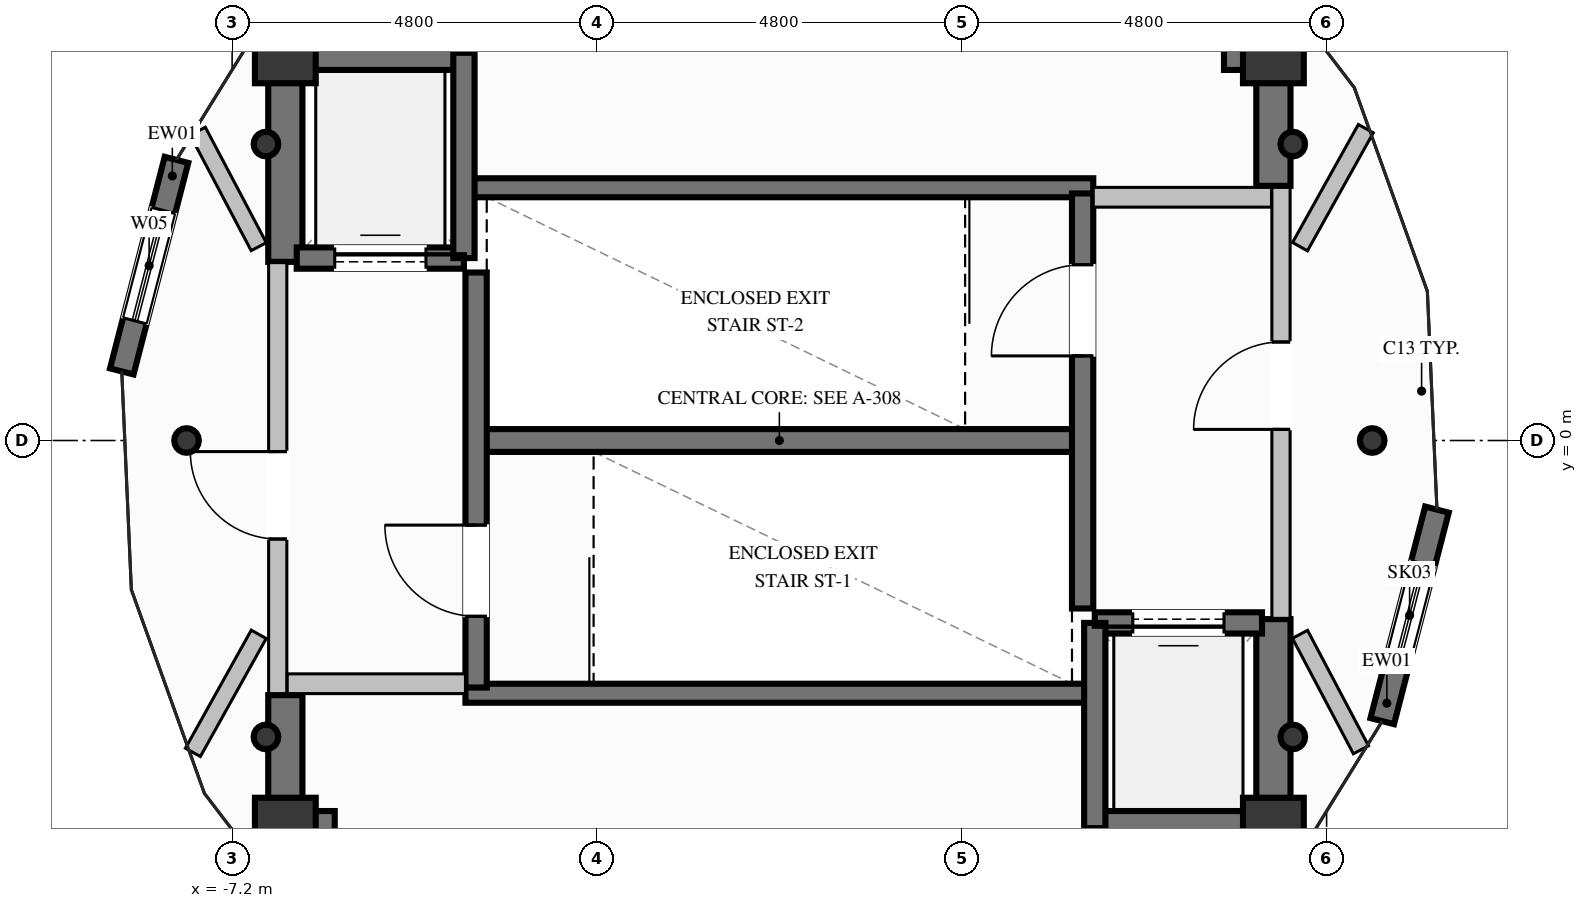
"""IFC4 building model, lengths in metres.
Left out: names, types, materials, properties, quantities, classifications, styles, units other than length and angle.
Written with IfcOpenShell. Run it as: python <this file> out.ifc"""

import sys

from ifc_helpers import new_model, si_unit, direction, frame, frame_2d, origin, origin_2d, place, context, subcontext, project, spatial, rectangle, hollow_circle, extrude, element, fill, save


model = new_model("IFC4")
c1 = context("Model", 3, precision=1e-05, world=origin(), true_north=direction((0.0, 1.0)))
c2 = subcontext(c1, "Body", "Model", "MODEL_VIEW")
j1 = project(units=[si_unit("LENGTHUNIT", "METRE"), si_unit("PLANEANGLEUNIT", "RADIAN")], contexts=[c1])
p1 = place(None, origin())
s1 = spatial("IfcSite", under=j1, at=p1, CompositionType="ELEMENT")
p2 = place(p1, origin())
s2 = spatial("IfcBuilding", under=s1, at=p2, CompositionType="ELEMENT")
p3 = place(p2, frame((0.0, 0.0, 333.8)))
s3 = spatial("IfcBuildingStorey", under=s2, at=p3, CompositionType="ELEMENT", Elevation=333.8)
for number, where, z_axis, x_axis in (
    (1, (-6.5, -5.1, 0.0), (0.0, 0.0, 1.0), (1.0, 0.0, 0.0)),
    (2, (6.5, -5.1, 0.0), (0.0, 0.0, 1.0), (1.0, 0.0, 0.0)),
    (3, (6.5, 5.1, 0.0), (0.0, 0.0, 1.0), (1.0, 0.0, 0.0)),
    (4, (-6.5, 5.1, 0.0), (0.0, 0.0, 1.0), (1.0, 0.0, 0.0)),
):
    element("IfcColumn", number, at=place(p3, frame(where, z_axis=z_axis, x_axis=x_axis)), inside=s3, PredefinedType="COLUMN", context=c2, shape_type="SweptSolid", body=[
        extrude(rectangle(XDim=0.8, YDim=0.8, at=origin_2d()), origin(), (0.0, 0.0, 1.0), 6.4),
    ])
p4 = place(p3, frame((-3.99, 0.0, 0.0), z_axis=(0.0, 0.0, 1.0), x_axis=(1.0, 0.0, 0.0)))
e5 = element("IfcWall", 5, at=p4, inside=s3, PredefinedType="SHEAR", context=c2, shape_type="SweptSolid", body=[
    extrude(rectangle(XDim=7.98, YDim=0.3, at=frame_2d((3.99, 0.0))), origin(), (0.0, 0.0, 1.0), 6.4),
])
for number, where, z_axis, x_axis in (
    (6, (-4.13, -3.325, 0.0), (0.0, 0.0, 1.0), (1.0, 0.0, 0.0)),
    (7, (-4.13, 3.325, 0.0), (0.0, 0.0, 1.0), (1.0, 0.0, 0.0)),
):
    element("IfcWall", number, at=place(p3, frame(where, z_axis=z_axis, x_axis=x_axis)), inside=s3, PredefinedType="SOLIDWALL", context=c2, shape_type="SweptSolid", body=[
        extrude(rectangle(XDim=8.26, YDim=0.25, at=frame_2d((4.13, 0.0))), origin(), (0.0, 0.0, 1.0), 6.4),
    ])
p5 = place(p3, frame((-6.275, -5.1, 0.0), z_axis=(0.0, 0.0, 1.0), x_axis=(1.0, 0.0, 0.0)))
e8 = element("IfcWall", 8, at=p5, inside=s3, PredefinedType="SHEAR", context=c2, shape_type="SweptSolid", body=[
    extrude(rectangle(XDim=0.425, YDim=0.45, at=frame_2d((0.212, 0.0))), origin(), (0.0, 0.0, 1.0), 6.4),
])
for number, where, z_axis, x_axis in (
    (9, (4.15, -5.1, 0.0), (0.0, 0.0, 1.0), (1.0, 0.0, 0.0)),
    (10, (-6.275, 5.1, 0.0), (0.0, 0.0, 1.0), (1.0, 0.0, 0.0)),
):
    element("IfcWall", number, at=place(p3, frame(where, z_axis=z_axis, x_axis=x_axis)), inside=s3, PredefinedType="SHEAR", context=c2, shape_type="SweptSolid", body=[
        extrude(rectangle(XDim=2.125, YDim=0.45, at=frame_2d((1.062, 0.0))), origin(), (0.0, 0.0, 1.0), 6.4),
    ])
p6 = place(p3, frame((5.85, 5.1, 0.0), z_axis=(0.0, 0.0, 1.0), x_axis=(1.0, 0.0, 0.0)))
e11 = element("IfcWall", 11, at=p6, inside=s3, PredefinedType="SHEAR", context=c2, shape_type="SweptSolid", body=[
    extrude(rectangle(XDim=0.425, YDim=0.45, at=frame_2d((0.212, 0.0))), origin(), (0.0, 0.0, 1.0), 6.4),
])
p7 = place(p3, frame((-6.5, 2.35, 0.0), z_axis=(0.0, 0.0, 1.0), x_axis=(0.0, 1.0, 0.0)))
e12 = element("IfcWall", 12, at=p7, inside=s3, PredefinedType="SHEAR", context=c2, shape_type="SweptSolid", body=[
    extrude(rectangle(XDim=2.975, YDim=0.45, at=frame_2d((1.487, 0.0))), origin(), (0.0, 0.0, 1.0), 6.4),
])
p8 = place(p3, frame((-6.5, -5.325, 0.0), z_axis=(0.0, 0.0, 1.0), x_axis=(0.0, 1.0, 0.0)))
e13 = element("IfcWall", 13, at=p8, inside=s3, PredefinedType="SHEAR", context=c2, shape_type="SweptSolid", body=[
    extrude(rectangle(XDim=1.975, YDim=0.45, at=frame_2d((0.987, 0.0))), origin(), (0.0, 0.0, 1.0), 6.4),
])
p9 = place(p3, frame((6.5, -5.325, 0.0), z_axis=(0.0, 0.0, 1.0), x_axis=(0.0, 1.0, 0.0)))
e14 = element("IfcWall", 14, at=p9, inside=s3, PredefinedType="SHEAR", context=c2, shape_type="SweptSolid", body=[
    extrude(rectangle(XDim=2.975, YDim=0.45, at=frame_2d((1.487, 0.0))), origin(), (0.0, 0.0, 1.0), 6.4),
])
p10 = place(p3, frame((6.5, 3.35, 0.0), z_axis=(0.0, 0.0, 1.0), x_axis=(0.0, 1.0, 0.0)))
e15 = element("IfcWall", 15, at=p10, inside=s3, PredefinedType="SHEAR", context=c2, shape_type="SweptSolid", body=[
    extrude(rectangle(XDim=1.975, YDim=0.45, at=frame_2d((0.987, 0.0))), origin(), (0.0, 0.0, 1.0), 6.4),
])
for number, where, z_axis, x_axis in (
    (16, (7.8, 0.0, 0.0), (0.0, 0.0, 1.0), (1.0, 0.0, 0.0)),
    (17, (6.755, 3.9, 0.0), (0.0, 0.0, 1.0), (1.0, 0.0, 0.0)),
    (18, (-6.755, 3.9, 0.0), (0.0, 0.0, 1.0), (1.0, 0.0, 0.0)),
    (19, (-7.8, 0.0, 0.0), (0.0, 0.0, 1.0), (1.0, 0.0, 0.0)),
    (20, (-6.755, -3.9, 0.0), (0.0, 0.0, 1.0), (1.0, 0.0, 0.0)),
    (21, (6.755, -3.9, 0.0), (0.0, 0.0, 1.0), (1.0, 0.0, 0.0)),
):
    element("IfcColumn", number, at=place(p3, frame(where, z_axis=z_axis, x_axis=x_axis)), inside=s3, PredefinedType="COLUMN", context=c2, shape_type="SweptSolid", body=[
        extrude(hollow_circle(Radius=0.162, WallThickness=0.014, at=origin_2d()), origin(), (0.0, 0.0, 1.0), 6.4),
    ])
p11 = place(p3, frame((8.652, -0.909, 0.0), z_axis=(0.0, 0.0, 1.0), x_axis=(-0.250540655551, -0.968106078855, 0.0)))
e22 = element("IfcWall", 22, at=p11, inside=s3, PredefinedType="SOLIDWALL", context=c2, shape_type="SweptSolid", body=[
    extrude(rectangle(XDim=2.875, YDim=0.32, at=frame_2d((1.438, 0.0))), origin(), (0.0, 0.0, 1.0), 6.1),
])
p12 = place(p11, frame((0.737, 0.0, 0.6)))
e23 = element("IfcOpeningElement", 23, at=p12, cuts=e22, PredefinedType="OPENING", context=c2, shape_type="SweptSolid", body=[
    extrude(rectangle(XDim=1.4, YDim=1.8, at=frame_2d((0.7, 0.9))), frame((0.0, 0.17, 0.0), z_axis=(0.0, -1.0, 0.0), x_axis=(1.0, 0.0, 0.0)), (0.0, 0.0, 1.0), 0.34),
])
p13 = place(p3, frame((-8.652, 0.909, 0.0), z_axis=(0.0, 0.0, 1.0), x_axis=(0.250540655551, 0.968106078855, 0.0)))
e24 = element("IfcWall", 24, at=p13, inside=s3, PredefinedType="SOLIDWALL", context=c2, shape_type="SweptSolid", body=[
    extrude(rectangle(XDim=2.875, YDim=0.32, at=frame_2d((1.438, 0.0))), origin(), (0.0, 0.0, 1.0), 6.1),
])
p14 = place(p13, frame((0.687, 0.0, 1.1)))
e25 = element("IfcOpeningElement", 25, at=p14, cuts=e24, PredefinedType="OPENING", context=c2, shape_type="SweptSolid", body=[
    extrude(rectangle(XDim=1.5, YDim=1.2, at=frame_2d((0.75, 0.6))), frame((0.0, 0.17, 0.0), z_axis=(0.0, -1.0, 0.0), x_axis=(1.0, 0.0, 0.0)), (0.0, 0.0, 1.0), 0.34),
])
p15 = place(p3, frame((-6.35, 2.4, 0.0), z_axis=(0.0, 0.0, 1.0), x_axis=(1.0, 0.0, 0.0)))
e26 = element("IfcWall", 26, at=p15, inside=s3, PredefinedType="SOLIDWALL", context=c2, shape_type="SweptSolid", body=[
    extrude(rectangle(XDim=2.2, YDim=0.28, at=frame_2d((1.1, 0.0))), origin(), (0.0, 0.0, 1.0), 6.1),
])
p16 = place(p15, frame((0.5, 0.0, 0.0)))
e27 = element("IfcOpeningElement", 27, at=p16, cuts=e26, PredefinedType="OPENING", context=c2, shape_type="SweptSolid", body=[
    extrude(rectangle(XDim=1.2, YDim=2.2, at=frame_2d((0.6, 1.1))), frame((0.0, 0.15, 0.0), z_axis=(0.0, -1.0, 0.0), x_axis=(1.0, 0.0, 0.0)), (0.0, 0.0, 1.0), 0.3),
])
p17 = place(p3, frame((-4.15, 2.4, 0.0), z_axis=(0.0, 0.0, 1.0), x_axis=(0.0, 1.0, 0.0)))
e28 = element("IfcWall", 28, at=p17, inside=s3, PredefinedType="SOLIDWALL", context=c2, shape_type="SweptSolid", body=[
    extrude(rectangle(XDim=2.7, YDim=0.28, at=frame_2d((1.35, 0.0))), origin(), (0.0, 0.0, 1.0), 6.1),
])
p18 = place(p3, frame((6.35, -2.4, 0.0), z_axis=(0.0, 0.0, 1.0), x_axis=(-1.0, 0.0, 0.0)))
e29 = element("IfcWall", 29, at=p18, inside=s3, PredefinedType="SOLIDWALL", context=c2, shape_type="SweptSolid", body=[
    extrude(rectangle(XDim=2.2, YDim=0.28, at=frame_2d((1.1, 0.0))), origin(), (0.0, 0.0, 1.0), 6.1),
])
p19 = place(p18, frame((0.5, 0.0, 0.0)))
e30 = element("IfcOpeningElement", 30, at=p19, cuts=e29, PredefinedType="OPENING", context=c2, shape_type="SweptSolid", body=[
    extrude(rectangle(XDim=1.2, YDim=2.2, at=frame_2d((0.6, 1.1))), frame((0.0, 0.15, 0.0), z_axis=(0.0, -1.0, 0.0), x_axis=(1.0, 0.0, 0.0)), (0.0, 0.0, 1.0), 0.3),
])
p20 = place(p3, frame((4.15, -2.4, 0.0), z_axis=(0.0, 0.0, 1.0), x_axis=(0.0, -1.0, 0.0)))
e31 = element("IfcWall", 31, at=p20, inside=s3, PredefinedType="SOLIDWALL", context=c2, shape_type="SweptSolid", body=[
    extrude(rectangle(XDim=2.7, YDim=0.28, at=frame_2d((1.35, 0.0))), origin(), (0.0, 0.0, 1.0), 6.1),
])
p21 = place(p3, frame((-3.99, -3.25, 0.0), z_axis=(0.0, 0.0, 1.0), x_axis=(0.0, 1.0, 0.0)))
e32 = element("IfcWall", 32, at=p21, inside=s3, PredefinedType="SOLIDWALL", context=c2, shape_type="SweptSolid", body=[
    extrude(rectangle(XDim=5.46, YDim=0.28, at=frame_2d((2.73, 0.0))), origin(), (0.0, 0.0, 1.0), 6.1),
])
p22 = place(p21, frame((0.937, 0.0, 0.0)))
e33 = element("IfcOpeningElement", 33, at=p22, cuts=e32, PredefinedType="OPENING", context=c2, shape_type="SweptSolid", body=[
    extrude(rectangle(XDim=1.2, YDim=2.2, at=frame_2d((0.6, 1.1))), frame((0.0, 0.15, 0.0), z_axis=(0.0, -1.0, 0.0), x_axis=(1.0, 0.0, 0.0)), (0.0, 0.0, 1.0), 0.3),
])
p23 = place(p3, frame((3.99, -2.21, 0.0), z_axis=(0.0, 0.0, 1.0), x_axis=(0.0, 1.0, 0.0)))
e34 = element("IfcWall", 34, at=p23, inside=s3, PredefinedType="SOLIDWALL", context=c2, shape_type="SweptSolid", body=[
    extrude(rectangle(XDim=5.46, YDim=0.28, at=frame_2d((2.73, 0.0))), origin(), (0.0, 0.0, 1.0), 6.1),
])
p24 = place(p23, frame((3.323, 0.0, 0.0)))
e35 = element("IfcOpeningElement", 35, at=p24, cuts=e34, PredefinedType="OPENING", context=c2, shape_type="SweptSolid", body=[
    extrude(rectangle(XDim=1.2, YDim=2.2, at=frame_2d((0.6, 1.1))), frame((0.0, 0.15, 0.0), z_axis=(0.0, -1.0, 0.0), x_axis=(1.0, 0.0, 0.0)), (0.0, 0.0, 1.0), 0.3),
])
p25 = place(p3, frame((-6.6, -3.33, 0.0), z_axis=(0.0, 0.0, 1.0), x_axis=(0.0, 1.0, 0.0)))
e36 = element("IfcWall", 36, at=p25, inside=s3, PredefinedType="PARTITIONING", context=c2, shape_type="SweptSolid", body=[
    extrude(rectangle(XDim=5.67, YDim=0.24, at=frame_2d((2.835, 0.0))), origin(), (0.0, 0.0, 1.0), 4.985),
])
p26 = place(p25, frame((2.034, 0.0, 0.0)))
e37 = element("IfcOpeningElement", 37, at=p26, cuts=e36, PredefinedType="OPENING", context=c2, shape_type="SweptSolid", body=[
    extrude(rectangle(XDim=1.15, YDim=2.2, at=frame_2d((0.575, 1.1))), frame((0.0, 0.13, 0.0), z_axis=(0.0, -1.0, 0.0), x_axis=(1.0, 0.0, 0.0)), (0.0, 0.0, 1.0), 0.26),
])
p27 = place(p3, frame((-6.475, -3.2, 0.0), z_axis=(0.0, 0.0, 1.0), x_axis=(1.0, 0.0, 0.0)))
e38 = element("IfcWall", 38, at=p27, inside=s3, PredefinedType="PARTITIONING", context=c2, shape_type="SweptSolid", body=[
    extrude(rectangle(XDim=2.345, YDim=0.26, at=frame_2d((1.173, 0.0))), origin(), (0.0, 0.0, 1.0), 6.1),
])
p28 = place(p3, frame((6.6, -2.34, 0.0), z_axis=(0.0, 0.0, 1.0), x_axis=(0.0, 1.0, 0.0)))
e39 = element("IfcWall", 39, at=p28, inside=s3, PredefinedType="PARTITIONING", context=c2, shape_type="SweptSolid", body=[
    extrude(rectangle(XDim=5.67, YDim=0.24, at=frame_2d((2.835, 0.0))), origin(), (0.0, 0.0, 1.0), 4.985),
])
p29 = place(p28, frame((2.486, 0.0, 0.0)))
e40 = element("IfcOpeningElement", 40, at=p29, cuts=e39, PredefinedType="OPENING", context=c2, shape_type="SweptSolid", body=[
    extrude(rectangle(XDim=1.15, YDim=2.2, at=frame_2d((0.575, 1.1))), frame((0.0, 0.13, 0.0), z_axis=(0.0, -1.0, 0.0), x_axis=(1.0, 0.0, 0.0)), (0.0, 0.0, 1.0), 0.26),
])
p30 = place(p3, frame((4.13, 3.2, 0.0), z_axis=(0.0, 0.0, 1.0), x_axis=(1.0, 0.0, 0.0)))
e41 = element("IfcWall", 41, at=p30, inside=s3, PredefinedType="PARTITIONING", context=c2, shape_type="SweptSolid", body=[
    extrude(rectangle(XDim=2.345, YDim=0.26, at=frame_2d((1.173, 0.0))), origin(), (0.0, 0.0, 1.0), 6.1),
])
p31 = place(p3, frame((-6.85, 2.55, 0.0), z_axis=(0.0, 0.0, 1.0), x_axis=(-0.466888304663, 0.884316295773, 0.0)))
e42 = element("IfcWall", 42, at=p31, inside=s3, PredefinedType="PARTITIONING", context=c2, shape_type="SweptSolid", body=[
    extrude(rectangle(XDim=1.718, YDim=0.225, at=frame_2d((0.859, 0.0))), origin(), (0.0, 0.0, 1.0), 4.985),
])
for number, where, z_axis, x_axis in (
    (43, (-6.85, -2.55, 0.0), (0.0, 0.0, 1.0), (-0.487, -0.873, 0.0)),
    (44, (6.85, 2.55, 0.0), (0.0, 0.0, 1.0), (0.487, 0.873, 0.0)),
):
    element("IfcWall", number, at=place(p3, frame(where, z_axis=z_axis, x_axis=x_axis)), inside=s3, PredefinedType="PARTITIONING", context=c2, shape_type="SweptSolid", body=[
        extrude(rectangle(XDim=1.778, YDim=0.225, at=frame_2d((0.889, 0.0))), origin(), (0.0, 0.0, 1.0), 6.1),
    ])
p32 = place(p3, frame((6.85, -2.55, 0.0), z_axis=(0.0, 0.0, 1.0), x_axis=(0.466888304663, -0.884316295773, 0.0)))
e45 = element("IfcWall", 45, at=p32, inside=s3, PredefinedType="PARTITIONING", context=c2, shape_type="SweptSolid", body=[
    extrude(rectangle(XDim=1.718, YDim=0.225, at=frame_2d((0.859, 0.0))), origin(), (0.0, 0.0, 1.0), 4.985),
])
p33 = place(p12, origin())
e46 = element("IfcWindow", 46, at=p33, inside=s3, PartitioningType="SINGLE_PANEL", PredefinedType="SKYLIGHT", context=c2, shape_type="SweptSolid", body=[
    extrude(rectangle(XDim=1.4, YDim=1.8, at=frame_2d((0.7, 0.9))), frame((0.0, 0.03, 0.0), z_axis=(0.0, -1.0, 0.0), x_axis=(1.0, 0.0, 0.0)), (0.0, 0.0, 1.0), 0.06),
])
fill(e23, e46)
p34 = place(p14, origin())
e47 = element("IfcWindow", 47, at=p34, inside=s3, PartitioningType="SINGLE_PANEL", PredefinedType="WINDOW", context=c2, shape_type="SweptSolid", body=[
    extrude(rectangle(XDim=1.5, YDim=1.2, at=frame_2d((0.75, 0.6))), frame((0.0, 0.03, 0.0), z_axis=(0.0, -1.0, 0.0), x_axis=(1.0, 0.0, 0.0)), (0.0, 0.0, 1.0), 0.06),
])
fill(e25, e47)
p35 = place(p16, origin())
e48 = element("IfcDoor", 48, at=p35, inside=s3, OperationType="SLIDING_TO_LEFT", PredefinedType="DOOR", context=c2, shape_type="SweptSolid", body=[
    extrude(rectangle(XDim=1.2, YDim=2.2, at=frame_2d((0.6, 1.1))), frame((0.0, 0.025, 0.0), z_axis=(0.0, -1.0, 0.0), x_axis=(1.0, 0.0, 0.0)), (0.0, 0.0, 1.0), 0.05),
])
fill(e27, e48)
p36 = place(p19, origin())
e49 = element("IfcDoor", 49, at=p36, inside=s3, OperationType="SLIDING_TO_LEFT", PredefinedType="DOOR", context=c2, shape_type="SweptSolid", body=[
    extrude(rectangle(XDim=1.2, YDim=2.2, at=frame_2d((0.6, 1.1))), frame((0.0, 0.025, 0.0), z_axis=(0.0, -1.0, 0.0), x_axis=(1.0, 0.0, 0.0)), (0.0, 0.0, 1.0), 0.05),
])
fill(e30, e49)
p37 = place(p22, origin())
e50 = element("IfcDoor", 50, at=p37, inside=s3, OperationType="SINGLE_SWING_RIGHT", PredefinedType="DOOR", context=c2, shape_type="SweptSolid", body=[
    extrude(rectangle(XDim=1.2, YDim=2.2, at=frame_2d((0.6, 1.1))), frame((0.0, 0.025, 0.0), z_axis=(0.0, -1.0, 0.0), x_axis=(1.0, 0.0, 0.0)), (0.0, 0.0, 1.0), 0.05),
])
fill(e33, e50)
p38 = place(p24, origin())
e51 = element("IfcDoor", 51, at=p38, inside=s3, OperationType="SINGLE_SWING_LEFT", PredefinedType="DOOR", context=c2, shape_type="SweptSolid", body=[
    extrude(rectangle(XDim=1.2, YDim=2.2, at=frame_2d((0.6, 1.1))), frame((0.0, 0.025, 0.0), z_axis=(0.0, -1.0, 0.0), x_axis=(1.0, 0.0, 0.0)), (0.0, 0.0, 1.0), 0.05),
])
fill(e35, e51)
p39 = place(p26, origin())
e52 = element("IfcDoor", 52, at=p39, inside=s3, OperationType="SINGLE_SWING_RIGHT", PredefinedType="DOOR", context=c2, shape_type="SweptSolid", body=[
    extrude(rectangle(XDim=1.15, YDim=2.2, at=frame_2d((0.575, 1.1))), frame((0.0, 0.025, 0.0), z_axis=(0.0, -1.0, 0.0), x_axis=(1.0, 0.0, 0.0)), (0.0, 0.0, 1.0), 0.05),
])
fill(e37, e52)
p40 = place(p29, origin())
e53 = element("IfcDoor", 53, at=p40, inside=s3, OperationType="SINGLE_SWING_LEFT", PredefinedType="DOOR", context=c2, shape_type="SweptSolid", body=[
    extrude(rectangle(XDim=1.15, YDim=2.2, at=frame_2d((0.575, 1.1))), frame((0.0, 0.025, 0.0), z_axis=(0.0, -1.0, 0.0), x_axis=(1.0, 0.0, 0.0)), (0.0, 0.0, 1.0), 0.05),
])
fill(e40, e53)
save(model, sys.argv[1])
